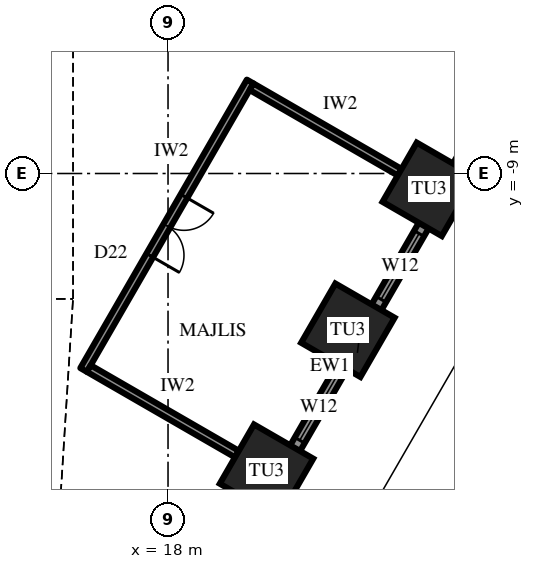
"""IFC4 building model, lengths in metres.
Left out: names, types, materials, properties, quantities, classifications, styles, units other than length and angle.
Written with IfcOpenShell. Run it as: python <this file> out.ifc"""

import sys

from ifc_helpers import new_model, si_unit, direction, frame, frame_2d, origin, origin_2d, place, context, subcontext, project, spatial, rectangle, hollow_rectangle, extrude, element, fill, save


model = new_model("IFC4")
c1 = context("Model", 3, precision=1e-05, world=origin(), true_north=direction((0.0, 1.0)))
c2 = subcontext(c1, "Body", "Model", "MODEL_VIEW")
j1 = project(units=[si_unit("LENGTHUNIT", "METRE"), si_unit("PLANEANGLEUNIT", "RADIAN")], contexts=[c1])
p1 = place(None, origin())
s1 = spatial("IfcSite", under=j1, at=p1, CompositionType="ELEMENT")
p2 = place(p1, origin())
s2 = spatial("IfcBuilding", under=s1, at=p2, CompositionType="ELEMENT")
p3 = place(p2, frame((0.0, 0.0, 311.5)))
s3 = spatial("IfcBuildingStorey", under=s2, at=p3, CompositionType="ELEMENT", Elevation=311.5)
for number, where, z_axis, x_axis in (
    (1, (20.592, -16.833, 0.0), (0.0, 0.0, 1.0), (0.5, 0.866, 0.0)),
    (2, (22.733, -13.125, 0.0), (0.0, 0.0, 1.0), (0.5, 0.866, 0.0)),
    (3, (24.874, -9.417, 0.0), (0.0, 0.0, 1.0), (0.5, 0.866, 0.0)),
):
    element("IfcColumn", number, at=place(p3, frame(where, z_axis=z_axis, x_axis=x_axis)), inside=s3, PredefinedType="COLUMN", context=c2, shape_type="SweptSolid", body=[
        extrude(hollow_rectangle(XDim=1.8, YDim=1.8, WallThickness=0.1, at=origin_2d()), origin(), (0.0, 0.0, 1.0), 4.2),
    ])
p4 = place(p3, frame((16.613, -24.425, 0.0), z_axis=(0.0, 0.0, 1.0), x_axis=(0.499997191038, 0.866027025533, 0.0)))
e4 = element("IfcWall", 4, at=p4, inside=s3, PredefinedType="SOLIDWALL", context=c2, shape_type="SweptSolid", body=[
    extrude(rectangle(XDim=25.692, YDim=0.3, at=frame_2d((12.846, 0.0))), origin(), (0.0, 0.0, 1.0), 2.0),
])
p5 = place(p4, frame((1.141, 0.0, 0.6)))
e5 = element("IfcOpeningElement", 5, at=p5, cuts=e4, PredefinedType="OPENING", context=c2, shape_type="SweptSolid", body=[
    extrude(rectangle(XDim=2.0, YDim=1.15, at=frame_2d((1.0, 0.575))), frame((0.0, 0.16, 0.0), z_axis=(0.0, -1.0, 0.0), x_axis=(1.0, 0.0, 0.0)), (0.0, 0.0, 1.0), 0.32),
])
p6 = place(p4, frame((5.423, 0.0, 0.6)))
e6 = element("IfcOpeningElement", 6, at=p6, cuts=e4, PredefinedType="OPENING", context=c2, shape_type="SweptSolid", body=[
    extrude(rectangle(XDim=2.0, YDim=1.15, at=frame_2d((1.0, 0.575))), frame((0.0, 0.16, 0.0), z_axis=(0.0, -1.0, 0.0), x_axis=(1.0, 0.0, 0.0)), (0.0, 0.0, 1.0), 0.32),
])
p7 = place(p4, frame((9.705, 0.0, 0.6)))
e7 = element("IfcOpeningElement", 7, at=p7, cuts=e4, PredefinedType="OPENING", context=c2, shape_type="SweptSolid", body=[
    extrude(rectangle(XDim=2.0, YDim=1.15, at=frame_2d((1.0, 0.575))), frame((0.0, 0.16, 0.0), z_axis=(0.0, -1.0, 0.0), x_axis=(1.0, 0.0, 0.0)), (0.0, 0.0, 1.0), 0.32),
])
p8 = place(p4, frame((13.987, 0.0, 0.6)))
e8 = element("IfcOpeningElement", 8, at=p8, cuts=e4, PredefinedType="OPENING", context=c2, shape_type="SweptSolid", body=[
    extrude(rectangle(XDim=2.0, YDim=1.15, at=frame_2d((1.0, 0.575))), frame((0.0, 0.16, 0.0), z_axis=(0.0, -1.0, 0.0), x_axis=(1.0, 0.0, 0.0)), (0.0, 0.0, 1.0), 0.32),
])
p9 = place(p4, frame((18.269, 0.0, 0.6)))
e9 = element("IfcOpeningElement", 9, at=p9, cuts=e4, PredefinedType="OPENING", context=c2, shape_type="SweptSolid", body=[
    extrude(rectangle(XDim=2.0, YDim=1.15, at=frame_2d((1.0, 0.575))), frame((0.0, 0.16, 0.0), z_axis=(0.0, -1.0, 0.0), x_axis=(1.0, 0.0, 0.0)), (0.0, 0.0, 1.0), 0.32),
])
p10 = place(p4, frame((22.551, 0.0, 0.6)))
e10 = element("IfcOpeningElement", 10, at=p10, cuts=e4, PredefinedType="OPENING", context=c2, shape_type="SweptSolid", body=[
    extrude(rectangle(XDim=2.0, YDim=1.15, at=frame_2d((1.0, 0.575))), frame((0.0, 0.16, 0.0), z_axis=(0.0, -1.0, 0.0), x_axis=(1.0, 0.0, 0.0)), (0.0, 0.0, 1.0), 0.32),
])
p11 = place(p3, frame((15.779, -14.17, 0.0), z_axis=(0.0, 0.0, 1.0), x_axis=(0.500006995557, 0.86602136486, 0.0)))
e11 = element("IfcWall", 11, at=p11, inside=s3, PredefinedType="PARTITIONING", context=c2, shape_type="SweptSolid", body=[
    extrude(rectangle(XDim=8.764, YDim=0.2, at=frame_2d((4.382, 0.0))), origin(), (0.0, 0.0, 1.0), 4.0),
])
p12 = place(p11, frame((3.482, 0.0, 0.0)))
e12 = element("IfcOpeningElement", 12, at=p12, cuts=e11, PredefinedType="OPENING", context=c2, shape_type="SweptSolid", body=[
    extrude(rectangle(XDim=1.8, YDim=2.4, at=frame_2d((0.9, 1.2))), frame((0.0, 0.11, 0.0), z_axis=(0.0, -1.0, 0.0), x_axis=(1.0, 0.0, 0.0)), (0.0, 0.0, 1.0), 0.22),
])
p13 = place(p3, frame((15.916, -14.133, 0.0), z_axis=(0.0, 0.0, 1.0), x_axis=(0.866031096941, -0.499990139034, 0.0)))
e13 = element("IfcWall", 13, at=p13, inside=s3, PredefinedType="PARTITIONING", context=c2, shape_type="SweptSolid", body=[
    extrude(rectangle(XDim=4.5, YDim=0.2, at=frame_2d((2.25, 0.0))), origin(), (0.0, 0.0, 1.0), 3.082),
])
p14 = place(p3, frame((20.198, -6.717, 0.0), z_axis=(0.0, 0.0, 1.0), x_axis=(0.866017533419, -0.500013631625, 0.0)))
e14 = element("IfcWall", 14, at=p14, inside=s3, PredefinedType="PARTITIONING", context=c2, shape_type="SweptSolid", body=[
    extrude(rectangle(XDim=4.5, YDim=0.2, at=frame_2d((2.25, 0.0))), origin(), (0.0, 0.0, 1.0), 2.992),
])
p15 = place(p7, origin())
e15 = element("IfcWindow", 15, at=p15, inside=s3, PartitioningType="SINGLE_PANEL", PredefinedType="WINDOW", context=c2, shape_type="SweptSolid", body=[
    extrude(rectangle(XDim=2.0, YDim=1.15, at=frame_2d((1.0, 0.575))), frame((0.0, 0.03, 0.0), z_axis=(0.0, -1.0, 0.0), x_axis=(1.0, 0.0, 0.0)), (0.0, 0.0, 1.0), 0.06),
])
fill(e7, e15)
p16 = place(p8, origin())
e16 = element("IfcWindow", 16, at=p16, inside=s3, PartitioningType="SINGLE_PANEL", PredefinedType="WINDOW", context=c2, shape_type="SweptSolid", body=[
    extrude(rectangle(XDim=2.0, YDim=1.15, at=frame_2d((1.0, 0.575))), frame((0.0, 0.03, 0.0), z_axis=(0.0, -1.0, 0.0), x_axis=(1.0, 0.0, 0.0)), (0.0, 0.0, 1.0), 0.06),
])
fill(e8, e16)
p17 = place(p12, frame((1.8, 0.0, 0.0), z_axis=(0.0, 0.0, 1.0), x_axis=(-1.0, 0.0, 0.0)))
e17 = element("IfcDoor", 17, at=p17, inside=s3, OperationType="DOUBLE_DOOR_SINGLE_SWING", PredefinedType="DOOR", context=c2, shape_type="SweptSolid", body=[
    extrude(rectangle(XDim=1.8, YDim=2.4, at=frame_2d((0.9, 1.2))), frame((0.0, 0.025, 0.0), z_axis=(0.0, -1.0, 0.0), x_axis=(1.0, 0.0, 0.0)), (0.0, 0.0, 1.0), 0.05),
])
fill(e12, e17)
save(model, sys.argv[1])
